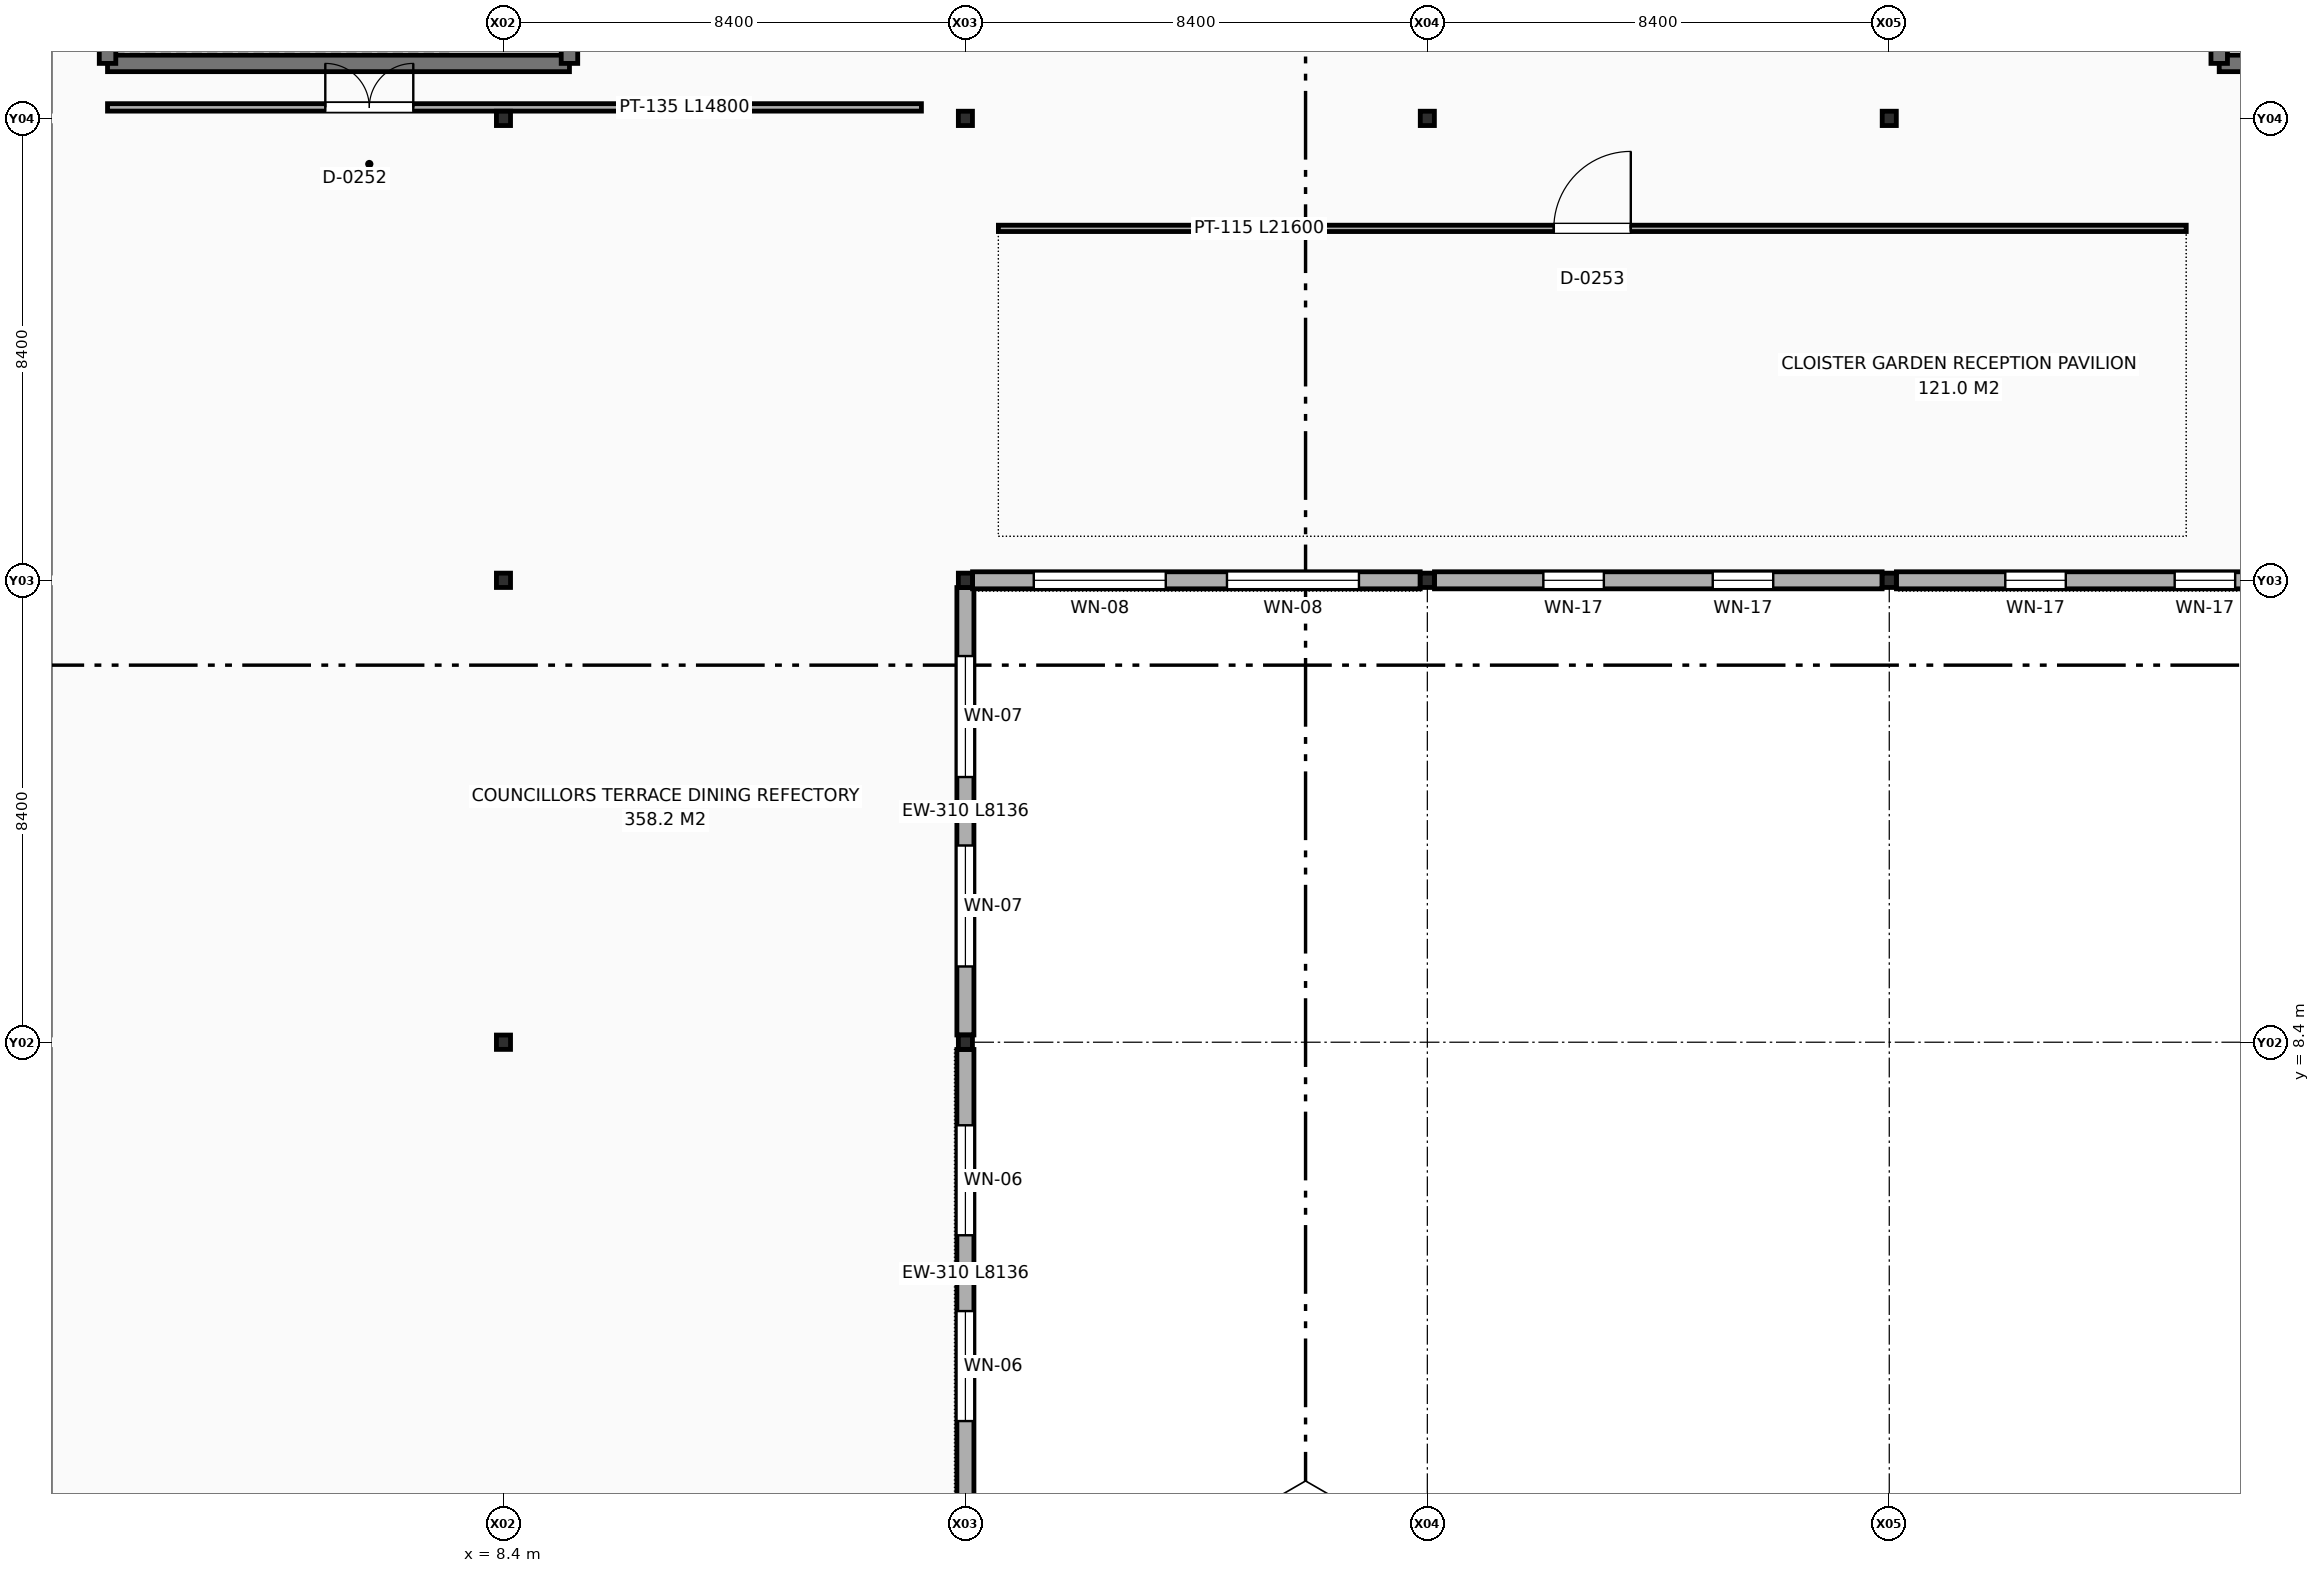
"""IFC4 building model, lengths in metres.
Left out: names, types, materials, properties, quantities, classifications, styles, units other than length and angle.
Written with IfcOpenShell. Run it as: python <this file> out.ifc"""

import sys

from ifc_helpers import new_model, si_unit, direction, frame, frame_2d, origin, origin_2d, place, context, subcontext, project, spatial, rectangle, i_section, extrude, element, fill, save


model = new_model("IFC4")
c1 = context("Model", 3, precision=1e-05, world=origin(), true_north=direction((0.0, 1.0)))
c2 = subcontext(c1, "Body", "Model", "MODEL_VIEW")
j1 = project(units=[si_unit("LENGTHUNIT", "METRE"), si_unit("PLANEANGLEUNIT", "RADIAN")], contexts=[c1])
p1 = place(None, origin())
s1 = spatial("IfcSite", under=j1, at=p1, CompositionType="ELEMENT")
p2 = place(p1, origin())
s2 = spatial("IfcBuilding", under=s1, at=p2, CompositionType="ELEMENT")
p3 = place(p2, frame((0.0, 0.0, 18.0)))
s3 = spatial("IfcBuildingStorey", under=s2, at=p3, CompositionType="ELEMENT", Elevation=18.0)
for number, where, z_axis, x_axis in (
    (1, (8.4, 8.4, 0.0), (0.0, 0.0, 1.0), (1.0, 0.0, 0.0)),
    (2, (8.4, 16.8, 0.0), (0.0, 0.0, 1.0), (1.0, 0.0, 0.0)),
    (3, (8.4, 25.2, 0.0), (0.0, 0.0, 1.0), (1.0, 0.0, 0.0)),
    (4, (16.8, 8.4, 0.0), (0.0, 0.0, 1.0), (1.0, 0.0, 0.0)),
    (5, (16.8, 16.8, 0.0), (0.0, 0.0, 1.0), (1.0, 0.0, 0.0)),
    (6, (16.8, 25.2, 0.0), (0.0, 0.0, 1.0), (1.0, 0.0, 0.0)),
    (7, (25.2, 16.8, 0.0), (0.0, 0.0, 1.0), (1.0, 0.0, 0.0)),
    (8, (25.2, 25.2, 0.0), (0.0, 0.0, 1.0), (1.0, 0.0, 0.0)),
    (9, (33.6, 16.8, 0.0), (0.0, 0.0, 1.0), (1.0, 0.0, 0.0)),
    (10, (33.6, 25.2, 0.0), (0.0, 0.0, 1.0), (1.0, 0.0, 0.0)),
):
    element("IfcColumn", number, at=place(p3, frame(where, z_axis=z_axis, x_axis=x_axis)), inside=s3, PredefinedType="COLUMN", context=c2, shape_type="SweptSolid", body=[
        extrude(i_section(OverallWidth=0.256, OverallDepth=0.26, WebThickness=0.01, FlangeThickness=0.017, FilletRadius=0.013, at=origin_2d()), origin(), (0.0, 0.0, 1.0), 4.2),
    ])
p4 = place(p3, frame((16.8, 0.132, 0.0), z_axis=(0.0, 0.0, 1.0), x_axis=(0.0, 1.0, 0.0)))
e11 = element("IfcWall", 11, at=p4, inside=s3, PredefinedType="SOLIDWALL", context=c2, shape_type="SweptSolid", body=[
    extrude(rectangle(XDim=8.136, YDim=0.31, at=frame_2d((4.068, 0.0))), origin(), (0.0, 0.0, 1.0), 3.32),
])
p5 = place(p4, frame((1.379, 0.0, 0.9)))
e12 = element("IfcOpeningElement", 12, at=p5, cuts=e11, PredefinedType="OPENING", context=c2, shape_type="SweptSolid", body=[
    extrude(rectangle(XDim=2.0, YDim=2.1, at=frame_2d((1.0, 1.05))), frame((0.0, 0.165, 0.0), z_axis=(0.0, -1.0, 0.0), x_axis=(1.0, 0.0, 0.0)), (0.0, 0.0, 1.0), 0.33),
])
p6 = place(p4, frame((4.757, 0.0, 0.9)))
e13 = element("IfcOpeningElement", 13, at=p6, cuts=e11, PredefinedType="OPENING", context=c2, shape_type="SweptSolid", body=[
    extrude(rectangle(XDim=2.0, YDim=2.1, at=frame_2d((1.0, 1.05))), frame((0.0, 0.165, 0.0), z_axis=(0.0, -1.0, 0.0), x_axis=(1.0, 0.0, 0.0)), (0.0, 0.0, 1.0), 0.33),
])
p7 = place(p3, frame((16.8, 8.532, 0.0), z_axis=(0.0, 0.0, 1.0), x_axis=(0.0, 1.0, 0.0)))
e14 = element("IfcWall", 14, at=p7, inside=s3, PredefinedType="SOLIDWALL", context=c2, shape_type="SweptSolid", body=[
    extrude(rectangle(XDim=8.136, YDim=0.31, at=frame_2d((4.068, 0.0))), origin(), (0.0, 0.0, 1.0), 3.32),
])
p8 = place(p7, frame((1.245, 0.0, 0.9)))
e15 = element("IfcOpeningElement", 15, at=p8, cuts=e14, PredefinedType="OPENING", context=c2, shape_type="SweptSolid", body=[
    extrude(rectangle(XDim=2.2, YDim=2.1, at=frame_2d((1.1, 1.05))), frame((0.0, 0.165, 0.0), z_axis=(0.0, -1.0, 0.0), x_axis=(1.0, 0.0, 0.0)), (0.0, 0.0, 1.0), 0.33),
])
p9 = place(p7, frame((4.69, 0.0, 0.9)))
e16 = element("IfcOpeningElement", 16, at=p9, cuts=e14, PredefinedType="OPENING", context=c2, shape_type="SweptSolid", body=[
    extrude(rectangle(XDim=2.2, YDim=2.1, at=frame_2d((1.1, 1.05))), frame((0.0, 0.165, 0.0), z_axis=(0.0, -1.0, 0.0), x_axis=(1.0, 0.0, 0.0)), (0.0, 0.0, 1.0), 0.33),
])
p10 = place(p3, frame((16.93, 16.8, 0.0), z_axis=(0.0, 0.0, 1.0), x_axis=(1.0, 0.0, 0.0)))
e17 = element("IfcWall", 17, at=p10, inside=s3, PredefinedType="SOLIDWALL", context=c2, shape_type="SweptSolid", body=[
    extrude(rectangle(XDim=8.14, YDim=0.31, at=frame_2d((4.07, 0.0))), origin(), (0.0, 0.0, 1.0), 3.27),
])
p11 = place(p10, frame((1.113, 0.0, 0.9)))
e18 = element("IfcOpeningElement", 18, at=p11, cuts=e17, PredefinedType="OPENING", context=c2, shape_type="SweptSolid", body=[
    extrude(rectangle(XDim=2.4, YDim=2.1, at=frame_2d((1.2, 1.05))), frame((0.0, 0.165, 0.0), z_axis=(0.0, -1.0, 0.0), x_axis=(1.0, 0.0, 0.0)), (0.0, 0.0, 1.0), 0.33),
])
p12 = place(p10, frame((4.626, 0.0, 0.9)))
e19 = element("IfcOpeningElement", 19, at=p12, cuts=e17, PredefinedType="OPENING", context=c2, shape_type="SweptSolid", body=[
    extrude(rectangle(XDim=2.4, YDim=2.1, at=frame_2d((1.2, 1.05))), frame((0.0, 0.165, 0.0), z_axis=(0.0, -1.0, 0.0), x_axis=(1.0, 0.0, 0.0)), (0.0, 0.0, 1.0), 0.33),
])
p13 = place(p3, frame((25.33, 16.8, 0.0), z_axis=(0.0, 0.0, 1.0), x_axis=(1.0, 0.0, 0.0)))
e20 = element("IfcWall", 20, at=p13, inside=s3, PredefinedType="SOLIDWALL", context=c2, shape_type="SweptSolid", body=[
    extrude(rectangle(XDim=8.14, YDim=0.31, at=frame_2d((4.07, 0.0))), origin(), (0.0, 0.0, 1.0), 3.27),
])
p14 = place(p13, frame((1.98, 0.0, 0.9)))
e21 = element("IfcOpeningElement", 21, at=p14, cuts=e20, PredefinedType="OPENING", context=c2, shape_type="SweptSolid", body=[
    extrude(rectangle(XDim=1.1, YDim=1.8, at=frame_2d((0.55, 0.9))), frame((0.0, 0.165, 0.0), z_axis=(0.0, -1.0, 0.0), x_axis=(1.0, 0.0, 0.0)), (0.0, 0.0, 1.0), 0.33),
])
p15 = place(p13, frame((5.06, 0.0, 0.9)))
e22 = element("IfcOpeningElement", 22, at=p15, cuts=e20, PredefinedType="OPENING", context=c2, shape_type="SweptSolid", body=[
    extrude(rectangle(XDim=1.1, YDim=1.8, at=frame_2d((0.55, 0.9))), frame((0.0, 0.165, 0.0), z_axis=(0.0, -1.0, 0.0), x_axis=(1.0, 0.0, 0.0)), (0.0, 0.0, 1.0), 0.33),
])
p16 = place(p3, frame((33.73, 16.8, 0.0), z_axis=(0.0, 0.0, 1.0), x_axis=(1.0, 0.0, 0.0)))
e23 = element("IfcWall", 23, at=p16, inside=s3, PredefinedType="SOLIDWALL", context=c2, shape_type="SweptSolid", body=[
    extrude(rectangle(XDim=8.14, YDim=0.31, at=frame_2d((4.07, 0.0))), origin(), (0.0, 0.0, 1.0), 3.27),
])
p17 = place(p16, frame((1.98, 0.0, 0.9)))
e24 = element("IfcOpeningElement", 24, at=p17, cuts=e23, PredefinedType="OPENING", context=c2, shape_type="SweptSolid", body=[
    extrude(rectangle(XDim=1.1, YDim=1.8, at=frame_2d((0.55, 0.9))), frame((0.0, 0.165, 0.0), z_axis=(0.0, -1.0, 0.0), x_axis=(1.0, 0.0, 0.0)), (0.0, 0.0, 1.0), 0.33),
])
p18 = place(p16, frame((5.06, 0.0, 0.9)))
e25 = element("IfcOpeningElement", 25, at=p18, cuts=e23, PredefinedType="OPENING", context=c2, shape_type="SweptSolid", body=[
    extrude(rectangle(XDim=1.1, YDim=1.8, at=frame_2d((0.55, 0.9))), frame((0.0, 0.165, 0.0), z_axis=(0.0, -1.0, 0.0), x_axis=(1.0, 0.0, 0.0)), (0.0, 0.0, 1.0), 0.33),
])
p19 = place(p3, frame((1.2, 26.2, 0.0), z_axis=(0.0, 0.0, 1.0), x_axis=(1.0, 0.0, 0.0)))
e26 = element("IfcWall", 26, at=p19, inside=s3, PredefinedType="SHEAR", context=c2, shape_type="SweptSolid", body=[
    extrude(rectangle(XDim=8.4, YDim=0.3, at=frame_2d((4.2, 0.0))), origin(), (0.0, 0.0, 1.0), 3.92),
])
p20 = place(p3, frame((9.6, 26.2, 0.0), z_axis=(0.0, 0.0, 1.0), x_axis=(0.0, 1.0, 0.0)))
e27 = element("IfcWall", 27, at=p20, inside=s3, PredefinedType="SHEAR", context=c2, shape_type="SweptSolid", body=[
    extrude(rectangle(XDim=4.2, YDim=0.3, at=frame_2d((2.1, 0.0))), origin(), (0.0, 0.0, 1.0), 3.92),
])
p21 = place(p20, frame((1.25, 0.0, 0.0)))
e28 = element("IfcOpeningElement", 28, at=p21, cuts=e27, PredefinedType="OPENING", context=c2, shape_type="SweptSolid", body=[
    extrude(rectangle(XDim=1.15, YDim=2.2, at=frame_2d((0.575, 1.1))), frame((0.0, 0.16, 0.0), z_axis=(0.0, -1.0, 0.0), x_axis=(1.0, 0.0, 0.0)), (0.0, 0.0, 1.0), 0.32),
])
p22 = place(p3, frame((1.2, 30.4, 0.0), z_axis=(0.0, 0.0, 1.0), x_axis=(0.0, -1.0, 0.0)))
e29 = element("IfcWall", 29, at=p22, inside=s3, PredefinedType="SHEAR", context=c2, shape_type="SweptSolid", body=[
    extrude(rectangle(XDim=4.2, YDim=0.3, at=frame_2d((2.1, 0.0))), origin(), (0.0, 0.0, 1.0), 3.92),
])
p23 = place(p3, frame((39.6, 26.2, 0.0), z_axis=(0.0, 0.0, 1.0), x_axis=(1.0, 0.0, 0.0)))
e30 = element("IfcWall", 30, at=p23, inside=s3, PredefinedType="SHEAR", context=c2, shape_type="SweptSolid", body=[
    extrude(rectangle(XDim=8.4, YDim=0.3, at=frame_2d((4.2, 0.0))), origin(), (0.0, 0.0, 1.0), 3.92),
])
p24 = place(p3, frame((39.6, 30.4, 0.0), z_axis=(0.0, 0.0, 1.0), x_axis=(0.0, -1.0, 0.0)))
e31 = element("IfcWall", 31, at=p24, inside=s3, PredefinedType="SHEAR", context=c2, shape_type="SweptSolid", body=[
    extrude(rectangle(XDim=4.2, YDim=0.3, at=frame_2d((2.1, 0.0))), origin(), (0.0, 0.0, 1.0), 3.92),
])
p25 = place(p24, frame((1.25, 0.0, 0.0)))
e32 = element("IfcOpeningElement", 32, at=p25, cuts=e31, PredefinedType="OPENING", context=c2, shape_type="SweptSolid", body=[
    extrude(rectangle(XDim=1.15, YDim=2.2, at=frame_2d((0.575, 1.1))), frame((0.0, 0.16, 0.0), z_axis=(0.0, -1.0, 0.0), x_axis=(1.0, 0.0, 0.0)), (0.0, 0.0, 1.0), 0.32),
])
p26 = place(p3, frame((1.2, 25.4, 0.0), z_axis=(0.0, 0.0, 1.0), x_axis=(1.0, 0.0, 0.0)))
e33 = element("IfcWall", 33, at=p26, inside=s3, PredefinedType="PARTITIONING", context=c2, shape_type="SweptSolid", body=[
    extrude(rectangle(XDim=14.8, YDim=0.135, at=frame_2d((7.4, 0.0))), origin(), (0.0, 0.0, 1.0), 3.27),
])
p27 = place(p26, frame((3.96, 0.0, 0.0)))
e34 = element("IfcOpeningElement", 34, at=p27, cuts=e33, PredefinedType="OPENING", context=c2, shape_type="SweptSolid", body=[
    extrude(rectangle(XDim=1.6, YDim=2.3, at=frame_2d((0.8, 1.15))), frame((0.0, 0.077, 0.0), z_axis=(0.0, -1.0, 0.0), x_axis=(1.0, 0.0, 0.0)), (0.0, 0.0, 1.0), 0.155),
])
p28 = place(p3, frame((17.4, 23.2, 0.0), z_axis=(0.0, 0.0, 1.0), x_axis=(1.0, 0.0, 0.0)))
e35 = element("IfcWall", 35, at=p28, inside=s3, PredefinedType="PARTITIONING", context=c2, shape_type="SweptSolid", body=[
    extrude(rectangle(XDim=21.6, YDim=0.115, at=frame_2d((10.8, 0.0))), origin(), (0.0, 0.0, 1.0), 3.86),
])
p29 = place(p28, frame((10.1, 0.0, 0.0)))
e36 = element("IfcOpeningElement", 36, at=p29, cuts=e35, PredefinedType="OPENING", context=c2, shape_type="SweptSolid", body=[
    extrude(rectangle(XDim=1.4, YDim=2.25, at=frame_2d((0.7, 1.125))), frame((0.0, 0.067, 0.0), z_axis=(0.0, -1.0, 0.0), x_axis=(1.0, 0.0, 0.0)), (0.0, 0.0, 1.0), 0.135),
])
p30 = place(p5, origin())
e37 = element("IfcWindow", 37, at=p30, inside=s3, PartitioningType="SINGLE_PANEL", PredefinedType="WINDOW", context=c2, shape_type="SweptSolid", body=[
    extrude(rectangle(XDim=2.0, YDim=2.1, at=frame_2d((1.0, 1.05))), frame((0.0, 0.03, 0.0), z_axis=(0.0, -1.0, 0.0), x_axis=(1.0, 0.0, 0.0)), (0.0, 0.0, 1.0), 0.06),
])
fill(e12, e37)
p31 = place(p6, origin())
e38 = element("IfcWindow", 38, at=p31, inside=s3, PartitioningType="SINGLE_PANEL", PredefinedType="WINDOW", context=c2, shape_type="SweptSolid", body=[
    extrude(rectangle(XDim=2.0, YDim=2.1, at=frame_2d((1.0, 1.05))), frame((0.0, 0.03, 0.0), z_axis=(0.0, -1.0, 0.0), x_axis=(1.0, 0.0, 0.0)), (0.0, 0.0, 1.0), 0.06),
])
fill(e13, e38)
p32 = place(p8, origin())
e39 = element("IfcWindow", 39, at=p32, inside=s3, PartitioningType="SINGLE_PANEL", PredefinedType="WINDOW", context=c2, shape_type="SweptSolid", body=[
    extrude(rectangle(XDim=2.2, YDim=2.1, at=frame_2d((1.1, 1.05))), frame((0.0, 0.03, 0.0), z_axis=(0.0, -1.0, 0.0), x_axis=(1.0, 0.0, 0.0)), (0.0, 0.0, 1.0), 0.06),
])
fill(e15, e39)
p33 = place(p9, origin())
e40 = element("IfcWindow", 40, at=p33, inside=s3, PartitioningType="SINGLE_PANEL", PredefinedType="WINDOW", context=c2, shape_type="SweptSolid", body=[
    extrude(rectangle(XDim=2.2, YDim=2.1, at=frame_2d((1.1, 1.05))), frame((0.0, 0.03, 0.0), z_axis=(0.0, -1.0, 0.0), x_axis=(1.0, 0.0, 0.0)), (0.0, 0.0, 1.0), 0.06),
])
fill(e16, e40)
p34 = place(p11, origin())
e41 = element("IfcWindow", 41, at=p34, inside=s3, PartitioningType="SINGLE_PANEL", PredefinedType="WINDOW", context=c2, shape_type="SweptSolid", body=[
    extrude(rectangle(XDim=2.4, YDim=2.1, at=frame_2d((1.2, 1.05))), frame((0.0, 0.03, 0.0), z_axis=(0.0, -1.0, 0.0), x_axis=(1.0, 0.0, 0.0)), (0.0, 0.0, 1.0), 0.06),
])
fill(e18, e41)
p35 = place(p12, origin())
e42 = element("IfcWindow", 42, at=p35, inside=s3, PartitioningType="SINGLE_PANEL", PredefinedType="WINDOW", context=c2, shape_type="SweptSolid", body=[
    extrude(rectangle(XDim=2.4, YDim=2.1, at=frame_2d((1.2, 1.05))), frame((0.0, 0.03, 0.0), z_axis=(0.0, -1.0, 0.0), x_axis=(1.0, 0.0, 0.0)), (0.0, 0.0, 1.0), 0.06),
])
fill(e19, e42)
p36 = place(p14, origin())
e43 = element("IfcWindow", 43, at=p36, inside=s3, PartitioningType="SINGLE_PANEL", PredefinedType="WINDOW", context=c2, shape_type="SweptSolid", body=[
    extrude(rectangle(XDim=1.1, YDim=1.8, at=frame_2d((0.55, 0.9))), frame((0.0, 0.03, 0.0), z_axis=(0.0, -1.0, 0.0), x_axis=(1.0, 0.0, 0.0)), (0.0, 0.0, 1.0), 0.06),
])
fill(e21, e43)
p37 = place(p15, origin())
e44 = element("IfcWindow", 44, at=p37, inside=s3, PartitioningType="SINGLE_PANEL", PredefinedType="WINDOW", context=c2, shape_type="SweptSolid", body=[
    extrude(rectangle(XDim=1.1, YDim=1.8, at=frame_2d((0.55, 0.9))), frame((0.0, 0.03, 0.0), z_axis=(0.0, -1.0, 0.0), x_axis=(1.0, 0.0, 0.0)), (0.0, 0.0, 1.0), 0.06),
])
fill(e22, e44)
p38 = place(p17, origin())
e45 = element("IfcWindow", 45, at=p38, inside=s3, PartitioningType="SINGLE_PANEL", PredefinedType="WINDOW", context=c2, shape_type="SweptSolid", body=[
    extrude(rectangle(XDim=1.1, YDim=1.8, at=frame_2d((0.55, 0.9))), frame((0.0, 0.03, 0.0), z_axis=(0.0, -1.0, 0.0), x_axis=(1.0, 0.0, 0.0)), (0.0, 0.0, 1.0), 0.06),
])
fill(e24, e45)
p39 = place(p18, origin())
e46 = element("IfcWindow", 46, at=p39, inside=s3, PartitioningType="SINGLE_PANEL", PredefinedType="WINDOW", context=c2, shape_type="SweptSolid", body=[
    extrude(rectangle(XDim=1.1, YDim=1.8, at=frame_2d((0.55, 0.9))), frame((0.0, 0.03, 0.0), z_axis=(0.0, -1.0, 0.0), x_axis=(1.0, 0.0, 0.0)), (0.0, 0.0, 1.0), 0.06),
])
fill(e25, e46)
p40 = place(p27, origin())
e47 = element("IfcDoor", 47, at=p40, inside=s3, OperationType="DOUBLE_DOOR_SINGLE_SWING", PredefinedType="DOOR", context=c2, shape_type="SweptSolid", body=[
    extrude(rectangle(XDim=1.6, YDim=2.3, at=frame_2d((0.8, 1.15))), frame((0.0, 0.025, 0.0), z_axis=(0.0, -1.0, 0.0), x_axis=(1.0, 0.0, 0.0)), (0.0, 0.0, 1.0), 0.05),
])
fill(e34, e47)
p41 = place(p29, origin())
e48 = element("IfcDoor", 48, at=p41, inside=s3, OperationType="SINGLE_SWING_RIGHT", PredefinedType="DOOR", context=c2, shape_type="SweptSolid", body=[
    extrude(rectangle(XDim=1.4, YDim=2.25, at=frame_2d((0.7, 1.125))), frame((0.0, 0.025, 0.0), z_axis=(0.0, -1.0, 0.0), x_axis=(1.0, 0.0, 0.0)), (0.0, 0.0, 1.0), 0.05),
])
fill(e36, e48)
save(model, sys.argv[1])
